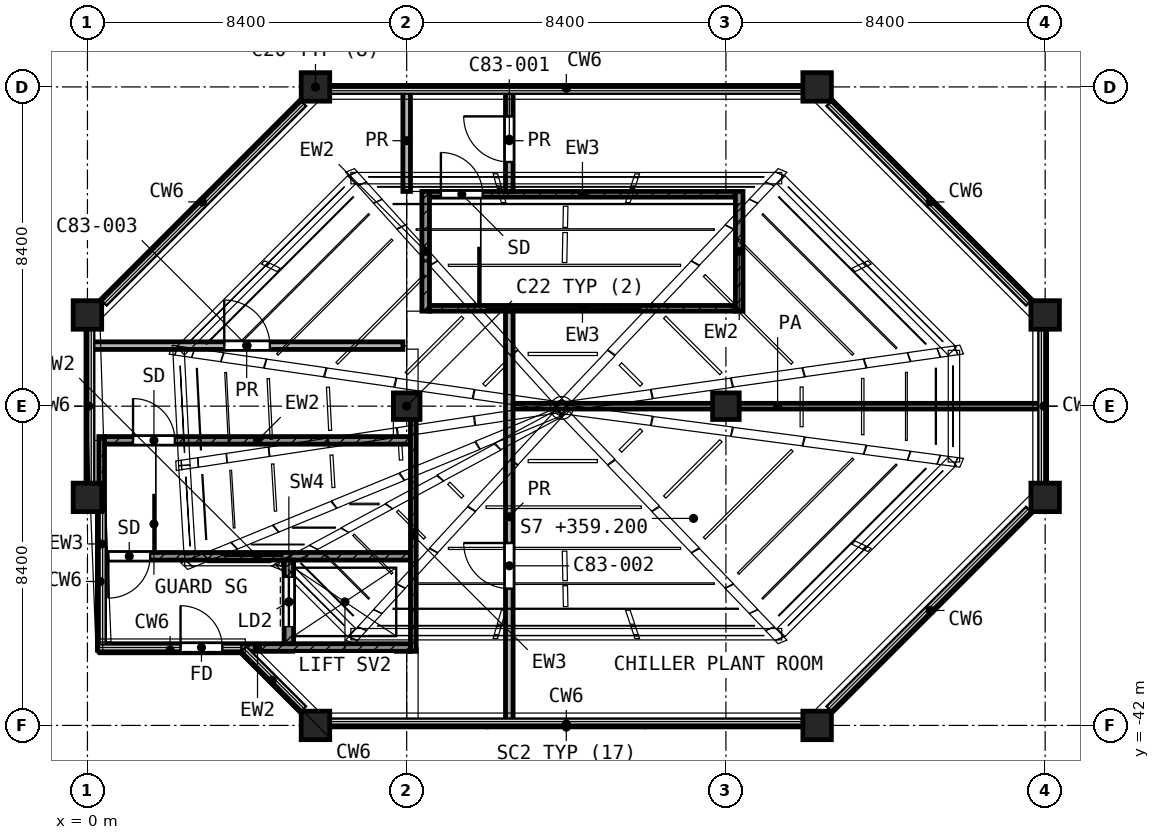
"""IFC4 building model, lengths in metres.
Left out: names, types, materials, properties, quantities, classifications, styles, units other than length and angle.
Written with IfcOpenShell. Run it as: python <this file> out.ifc"""

import sys

from ifc_helpers import new_model, si_unit, direction, frame, frame_2d, origin, origin_2d, place, context, subcontext, project, spatial, rectangle, extrude, element, fill, save


model = new_model("IFC4")
c1 = context("Model", 3, precision=1e-05, world=origin(), true_north=direction((0.0, 1.0)))
c2 = subcontext(c1, "Body", "Model", "MODEL_VIEW")
j1 = project(units=[si_unit("LENGTHUNIT", "METRE"), si_unit("PLANEANGLEUNIT", "RADIAN")], contexts=[c1])
p1 = place(None, origin())
s1 = spatial("IfcSite", under=j1, at=p1, CompositionType="ELEMENT")
p2 = place(p1, origin())
s2 = spatial("IfcBuilding", under=s1, at=p2, CompositionType="ELEMENT")
p3 = place(p2, frame((0.0, 0.0, 359.2)))
s3 = spatial("IfcBuildingStorey", under=s2, at=p3, CompositionType="ELEMENT", Elevation=359.2)
for number, where, z_axis, x_axis in (
    (1, (6.0, -25.2, 0.0), (0.0, 0.0, 1.0), (1.0, 0.0, 0.0)),
    (2, (19.2, -25.2, 0.0), (0.0, 0.0, 1.0), (1.0, 0.0, 0.0)),
    (3, (0.0, -31.2, 0.0), (0.0, 0.0, 1.0), (1.0, 0.0, 0.0)),
    (4, (25.2, -31.2, 0.0), (0.0, 0.0, 1.0), (1.0, 0.0, 0.0)),
):
    element("IfcColumn", number, at=place(p3, frame(where, z_axis=z_axis, x_axis=x_axis)), inside=s3, PredefinedType="COLUMN", context=c2, shape_type="SweptSolid", body=[
        extrude(rectangle(XDim=0.75, YDim=0.75, at=origin_2d()), origin(), (0.0, 0.0, 1.0), 4.5),
    ])
for number, where, z_axis, x_axis in (
    (5, (8.4, -33.6, 0.0), (0.0, 0.0, 1.0), (1.0, 0.0, 0.0)),
    (6, (16.8, -33.6, 0.0), (0.0, 0.0, 1.0), (1.0, 0.0, 0.0)),
):
    element("IfcColumn", number, at=place(p3, frame(where, z_axis=z_axis, x_axis=x_axis)), inside=s3, PredefinedType="COLUMN", context=c2, shape_type="SweptSolid", body=[
        extrude(rectangle(XDim=0.7, YDim=0.7, at=origin_2d()), origin(), (0.0, 0.0, 1.0), 4.5),
    ])
for number, where, z_axis, x_axis in (
    (7, (0.0, -36.0, 0.0), (0.0, 0.0, 1.0), (1.0, 0.0, 0.0)),
    (8, (25.2, -36.0, 0.0), (0.0, 0.0, 1.0), (1.0, 0.0, 0.0)),
    (9, (6.0, -42.0, 0.0), (0.0, 0.0, 1.0), (1.0, 0.0, 0.0)),
    (10, (19.2, -42.0, 0.0), (0.0, 0.0, 1.0), (1.0, 0.0, 0.0)),
):
    element("IfcColumn", number, at=place(p3, frame(where, z_axis=z_axis, x_axis=x_axis)), inside=s3, PredefinedType="COLUMN", context=c2, shape_type="SweptSolid", body=[
        extrude(rectangle(XDim=0.75, YDim=0.75, at=origin_2d()), origin(), (0.0, 0.0, 1.0), 4.5),
    ])
p4 = place(p3, frame((0.305, -39.925, 4.5), z_axis=(0.0, 0.0, 1.0), x_axis=(1.0, 0.0, 0.0)))
e11 = element("IfcWall", 11, at=p4, inside=s3, PredefinedType="SOLIDWALL", context=c2, shape_type="SweptSolid", body=[
    extrude(rectangle(XDim=3.849, YDim=0.25, at=frame_2d((1.924, 0.0))), origin(), (0.0, 0.0, 1.0), 1.1),
])
p5 = place(p3, frame((4.138, -39.962, 4.5), z_axis=(0.0, 0.0, 1.0), x_axis=(0.707106781187, -0.707106781187, 0.0)))
e12 = element("IfcWall", 12, at=p5, inside=s3, PredefinedType="SOLIDWALL", context=c2, shape_type="SweptSolid", body=[
    extrude(rectangle(XDim=2.654, YDim=0.25, at=frame_2d((1.327, 0.0))), origin(), (0.0, 0.0, 1.0), 1.1),
])
p6 = place(p3, frame((6.0, -41.875, 4.5), z_axis=(0.0, 0.0, 1.0), x_axis=(1.0, 0.0, 0.0)))
e13 = element("IfcWall", 13, at=p6, inside=s3, PredefinedType="SOLIDWALL", context=c2, shape_type="SweptSolid", body=[
    extrude(rectangle(XDim=13.2, YDim=0.25, at=frame_2d((6.6, 0.0))), origin(), (0.0, 0.0, 1.0), 1.1),
])
p7 = place(p3, frame((19.185, -41.838, 4.5), z_axis=(0.0, 0.0, 1.0), x_axis=(0.707106781187, 0.707106781187, 0.0)))
e14 = element("IfcWall", 14, at=p7, inside=s3, PredefinedType="SOLIDWALL", context=c2, shape_type="SweptSolid", body=[
    extrude(rectangle(XDim=8.278, YDim=0.25, at=frame_2d((4.139, 0.0))), origin(), (0.0, 0.0, 1.0), 1.1),
])
p8 = place(p3, frame((25.075, -36.0, 4.5), z_axis=(0.0, 0.0, 1.0), x_axis=(0.0, 1.0, 0.0)))
e15 = element("IfcWall", 15, at=p8, inside=s3, PredefinedType="SOLIDWALL", context=c2, shape_type="SweptSolid", body=[
    extrude(rectangle(XDim=4.8, YDim=0.25, at=frame_2d((2.4, 0.0))), origin(), (0.0, 0.0, 1.0), 1.1),
])
p9 = place(p3, frame((25.038, -31.215, 4.5), z_axis=(0.0, 0.0, 1.0), x_axis=(-0.707106781187, 0.707106781187, 0.0)))
e16 = element("IfcWall", 16, at=p9, inside=s3, PredefinedType="SOLIDWALL", context=c2, shape_type="SweptSolid", body=[
    extrude(rectangle(XDim=8.278, YDim=0.25, at=frame_2d((4.139, 0.0))), origin(), (0.0, 0.0, 1.0), 1.1),
])
p10 = place(p3, frame((19.2, -25.325, 4.5), z_axis=(0.0, 0.0, 1.0), x_axis=(-1.0, 0.0, 0.0)))
e17 = element("IfcWall", 17, at=p10, inside=s3, PredefinedType="SOLIDWALL", context=c2, shape_type="SweptSolid", body=[
    extrude(rectangle(XDim=13.2, YDim=0.25, at=frame_2d((6.6, 0.0))), origin(), (0.0, 0.0, 1.0), 1.1),
])
p11 = place(p3, frame((6.015, -25.362, 4.5), z_axis=(0.0, 0.0, 1.0), x_axis=(-0.707106781187, -0.707106781187, 0.0)))
e18 = element("IfcWall", 18, at=p11, inside=s3, PredefinedType="SOLIDWALL", context=c2, shape_type="SweptSolid", body=[
    extrude(rectangle(XDim=8.276, YDim=0.25, at=frame_2d((4.138, 0.0))), origin(), (0.0, 0.0, 1.0), 1.1),
])
p12 = place(p3, frame((0.123, -31.198, 4.5), z_axis=(0.0, 0.0, 1.0), x_axis=(0.030920746352, -0.999521839404, 0.0)))
e19 = element("IfcWall", 19, at=p12, inside=s3, PredefinedType="SOLIDWALL", context=c2, shape_type="SweptSolid", body=[
    extrude(rectangle(XDim=4.903, YDim=0.25, at=frame_2d((2.452, 0.0))), origin(), (0.0, 0.0, 1.0), 1.1),
])
p13 = place(p3, frame((0.275, -36.099, 4.5), z_axis=(0.0, 0.0, 1.0), x_axis=(0.039229380017, -0.9992302316, 0.0)))
e20 = element("IfcWall", 20, at=p13, inside=s3, PredefinedType="SOLIDWALL", context=c2, shape_type="SweptSolid", body=[
    extrude(rectangle(XDim=3.709, YDim=0.25, at=frame_2d((1.854, 0.0))), origin(), (0.0, 0.0, 1.0), 1.1),
])
p14 = place(p3, frame((1.703, -31.971, 4.5), z_axis=(0.0, 0.0, 1.0), x_axis=(0.707106781187, 0.707106781187, 0.0)))
e21 = element("IfcWall", 21, at=p14, inside=s3, PredefinedType="SOLIDWALL", context=c2, shape_type="SweptSolid", body=[
    extrude(rectangle(XDim=7.164, YDim=0.3, at=frame_2d((3.582, 0.0))), origin(), (0.0, 0.0, 1.0), 0.4),
])
p15 = place(p3, frame((6.787, -26.95, 4.5), z_axis=(0.0, 0.0, 1.0), x_axis=(1.0, 0.0, 0.0)))
e22 = element("IfcWall", 22, at=p15, inside=s3, PredefinedType="SOLIDWALL", context=c2, shape_type="SweptSolid", body=[
    extrude(rectangle(XDim=11.626, YDim=0.3, at=frame_2d((5.813, 0.0))), origin(), (0.0, 0.0, 1.0), 0.4),
])
p16 = place(p3, frame((18.431, -26.906, 4.5), z_axis=(0.0, 0.0, 1.0), x_axis=(0.707106781187, -0.707106781187, 0.0)))
e23 = element("IfcWall", 23, at=p16, inside=s3, PredefinedType="SOLIDWALL", context=c2, shape_type="SweptSolid", body=[
    extrude(rectangle(XDim=7.16, YDim=0.3, at=frame_2d((3.58, 0.0))), origin(), (0.0, 0.0, 1.0), 0.4),
])
p17 = place(p3, frame((23.45, -31.987, 4.5), z_axis=(0.0, 0.0, 1.0), x_axis=(0.0, -1.0, 0.0)))
e24 = element("IfcWall", 24, at=p17, inside=s3, PredefinedType="SOLIDWALL", context=c2, shape_type="SweptSolid", body=[
    extrude(rectangle(XDim=3.226, YDim=0.3, at=frame_2d((1.613, 0.0))), origin(), (0.0, 0.0, 1.0), 0.4),
])
p18 = place(p3, frame((23.494, -35.231, 4.5), z_axis=(0.0, 0.0, 1.0), x_axis=(-0.707106781187, -0.707106781187, 0.0)))
e25 = element("IfcWall", 25, at=p18, inside=s3, PredefinedType="SOLIDWALL", context=c2, shape_type="SweptSolid", body=[
    extrude(rectangle(XDim=7.16, YDim=0.3, at=frame_2d((3.58, 0.0))), origin(), (0.0, 0.0, 1.0), 0.4),
])
p19 = place(p3, frame((18.413, -40.25, 4.5), z_axis=(0.0, 0.0, 1.0), x_axis=(-1.0, 0.0, 0.0)))
e26 = element("IfcWall", 26, at=p19, inside=s3, PredefinedType="SOLIDWALL", context=c2, shape_type="SweptSolid", body=[
    extrude(rectangle(XDim=11.626, YDim=0.3, at=frame_2d((5.813, 0.0))), origin(), (0.0, 0.0, 1.0), 0.4),
])
p20 = place(p3, frame((6.769, -40.294, 4.5), z_axis=(0.0, 0.0, 1.0), x_axis=(-0.707106781187, 0.707106781187, 0.0)))
e27 = element("IfcWall", 27, at=p20, inside=s3, PredefinedType="SOLIDWALL", context=c2, shape_type="SweptSolid", body=[
    extrude(rectangle(XDim=2.882, YDim=0.3, at=frame_2d((1.441, 0.0))), origin(), (0.0, 0.0, 1.0), 0.4),
])
p21 = place(p3, frame((4.713, -38.3, 4.5), z_axis=(0.0, 0.0, 1.0), x_axis=(-1.0, 0.0, 0.0)))
e28 = element("IfcWall", 28, at=p21, inside=s3, PredefinedType="SOLIDWALL", context=c2, shape_type="SweptSolid", body=[
    extrude(rectangle(XDim=2.52, YDim=0.3, at=frame_2d((1.26, 0.0))), origin(), (0.0, 0.0, 1.0), 0.4),
])
p22 = place(p3, frame((2.057, -38.442, 4.5), z_axis=(0.0, 0.0, 1.0), x_axis=(-0.052109351445, 0.998641384828, 0.0)))
e29 = element("IfcWall", 29, at=p22, inside=s3, PredefinedType="SOLIDWALL", context=c2, shape_type="SweptSolid", body=[
    extrude(rectangle(XDim=3.022, YDim=0.3, at=frame_2d((1.511, 0.0))), origin(), (0.0, 0.0, 1.0), 0.4),
])
p23 = place(p3, frame((1.9, -35.424, 4.5), z_axis=(0.0, 0.0, 1.0), x_axis=(-0.042836071877, 0.999082114216, 0.0)))
e30 = element("IfcWall", 30, at=p23, inside=s3, PredefinedType="SOLIDWALL", context=c2, shape_type="SweptSolid", body=[
    extrude(rectangle(XDim=3.437, YDim=0.3, at=frame_2d((1.718, 0.0))), origin(), (0.0, 0.0, 1.0), 0.4),
])
p24 = place(p3, frame((0.375, -40.05, 0.0), z_axis=(0.0, 0.0, 1.0), x_axis=(0.0, 1.0, 0.0)))
e31 = element("IfcWall", 31, at=p24, inside=s3, PredefinedType="SHEAR", context=c2, shape_type="SweptSolid", body=[
    extrude(rectangle(XDim=5.65, YDim=0.15, at=frame_2d((2.825, 0.0))), origin(), (0.0, 0.0, 1.0), 4.15),
])
p25 = place(p3, frame((8.575, -40.05, 0.0), z_axis=(0.0, 0.0, 1.0), x_axis=(0.0, 1.0, 0.0)))
e32 = element("IfcWall", 32, at=p25, inside=s3, PredefinedType="SHEAR", context=c2, shape_type="SweptSolid", body=[
    extrude(rectangle(XDim=6.1, YDim=0.15, at=frame_2d((3.05, 0.0))), origin(), (0.0, 0.0, 1.0), 4.15),
])
p26 = place(p3, frame((0.45, -34.5, 0.0), z_axis=(0.0, 0.0, 1.0), x_axis=(1.0, 0.0, 0.0)))
e33 = element("IfcWall", 33, at=p26, inside=s3, PredefinedType="SHEAR", context=c2, shape_type="SweptSolid", body=[
    extrude(rectangle(XDim=8.05, YDim=0.2, at=frame_2d((4.025, 0.0))), origin(), (0.0, 0.0, 1.0), 4.15),
])
p27 = place(p26, frame((0.75, 0.0, 0.0)))
e34 = element("IfcOpeningElement", 34, at=p27, cuts=e33, PredefinedType="OPENING", context=c2, shape_type="SweptSolid", body=[
    extrude(rectangle(XDim=1.1, YDim=2.1, at=frame_2d((0.55, 1.05))), frame((0.0, 0.11, 0.0), z_axis=(0.0, -1.0, 0.0), x_axis=(1.0, 0.0, 0.0)), (0.0, 0.0, 1.0), 0.22),
])
p28 = place(p3, frame((0.45, -37.55, 0.0), z_axis=(0.0, 0.0, 1.0), x_axis=(1.0, 0.0, 0.0)))
e35 = element("IfcWall", 35, at=p28, inside=s3, PredefinedType="SHEAR", context=c2, shape_type="SweptSolid", body=[
    extrude(rectangle(XDim=8.05, YDim=0.2, at=frame_2d((4.025, 0.0))), origin(), (0.0, 0.0, 1.0), 4.15),
])
p29 = place(p28, frame((0.1, 0.0, 0.0)))
e36 = element("IfcOpeningElement", 36, at=p29, cuts=e35, PredefinedType="OPENING", context=c2, shape_type="SweptSolid", body=[
    extrude(rectangle(XDim=1.1, YDim=2.1, at=frame_2d((0.55, 1.05))), frame((0.0, 0.11, 0.0), z_axis=(0.0, -1.0, 0.0), x_axis=(1.0, 0.0, 0.0)), (0.0, 0.0, 1.0), 0.22),
])
p30 = place(p3, frame((0.45, -39.95, 0.0), z_axis=(0.0, 0.0, 1.0), x_axis=(1.0, 0.0, 0.0)))
e37 = element("IfcWall", 37, at=p30, inside=s3, PredefinedType="SHEAR", context=c2, shape_type="SweptSolid", body=[
    extrude(rectangle(XDim=8.05, YDim=0.2, at=frame_2d((4.025, 0.0))), origin(), (0.0, 0.0, 1.0), 4.15),
])
p31 = place(p30, frame((2.0, 0.0, 0.0)))
e38 = element("IfcOpeningElement", 38, at=p31, cuts=e37, PredefinedType="OPENING", context=c2, shape_type="SweptSolid", body=[
    extrude(rectangle(XDim=1.1, YDim=2.1, at=frame_2d((0.55, 1.05))), frame((0.0, 0.11, 0.0), z_axis=(0.0, -1.0, 0.0), x_axis=(1.0, 0.0, 0.0)), (0.0, 0.0, 1.0), 0.22),
])
p32 = place(p3, frame((5.3, -39.85, 0.0), z_axis=(0.0, 0.0, 1.0), x_axis=(0.0, 1.0, 0.0)))
e39 = element("IfcWall", 39, at=p32, inside=s3, PredefinedType="SHEAR", context=c2, shape_type="SweptSolid", body=[
    extrude(rectangle(XDim=2.2, YDim=0.25, at=frame_2d((1.1, 0.0))), origin(), (0.0, 0.0, 1.0), 4.15),
])
p33 = place(p32, frame((0.45, 0.0, 0.0)))
e40 = element("IfcOpeningElement", 40, at=p33, cuts=e39, PredefinedType="OPENING", context=c2, shape_type="SweptSolid", body=[
    extrude(rectangle(XDim=1.3, YDim=2.1, at=frame_2d((0.65, 1.05))), frame((0.0, 0.135, 0.0), z_axis=(0.0, -1.0, 0.0), x_axis=(1.0, 0.0, 0.0)), (0.0, 0.0, 1.0), 0.27),
])
for number, where, z_axis, x_axis in (
    (41, (8.9, -31.1, 0.0), (0.0, 0.0, 1.0), (0.0, 1.0, 0.0)),
    (42, (17.15, -31.1, 0.0), (0.0, 0.0, 1.0), (0.0, 1.0, 0.0)),
):
    element("IfcWall", number, at=place(p3, frame(where, z_axis=z_axis, x_axis=x_axis)), inside=s3, PredefinedType="SHEAR", context=c2, shape_type="SweptSolid", body=[
        extrude(rectangle(XDim=3.15, YDim=0.2, at=frame_2d((1.575, 0.0))), origin(), (0.0, 0.0, 1.0), 4.15),
    ])
p34 = place(p3, frame((9.0, -28.025, 0.0), z_axis=(0.0, 0.0, 1.0), x_axis=(1.0, 0.0, 0.0)))
e43 = element("IfcWall", 43, at=p34, inside=s3, PredefinedType="SHEAR", context=c2, shape_type="SweptSolid", body=[
    extrude(rectangle(XDim=8.05, YDim=0.15, at=frame_2d((4.025, 0.0))), origin(), (0.0, 0.0, 1.0), 4.15),
])
p35 = place(p34, frame((0.3, 0.0, 0.0)))
e44 = element("IfcOpeningElement", 44, at=p35, cuts=e43, PredefinedType="OPENING", context=c2, shape_type="SweptSolid", body=[
    extrude(rectangle(XDim=1.1, YDim=2.1, at=frame_2d((0.55, 1.05))), frame((0.0, 0.085, 0.0), z_axis=(0.0, -1.0, 0.0), x_axis=(1.0, 0.0, 0.0)), (0.0, 0.0, 1.0), 0.17),
])
p36 = place(p3, frame((9.0, -31.025, 0.0), z_axis=(0.0, 0.0, 1.0), x_axis=(1.0, 0.0, 0.0)))
e45 = element("IfcWall", 45, at=p36, inside=s3, PredefinedType="SHEAR", context=c2, shape_type="SweptSolid", body=[
    extrude(rectangle(XDim=8.05, YDim=0.15, at=frame_2d((4.025, 0.0))), origin(), (0.0, 0.0, 1.0), 4.15),
])
p37 = place(p3, frame((11.2, -33.6, 0.0), z_axis=(0.0, 0.0, 1.0), x_axis=(1.0, 0.0, 0.0)))
e46 = element("IfcWall", 46, at=p37, inside=s3, PredefinedType="PARTITIONING", context=c2, shape_type="SweptSolid", body=[
    extrude(rectangle(XDim=13.92, YDim=0.15, at=frame_2d((6.96, 0.0))), origin(), (0.0, 0.0, 1.0), 4.5),
])
p38 = place(p3, frame((0.08, -32.007, 0.0), z_axis=(0.0, 0.0, 1.0), x_axis=(1.0, 0.0, 0.0)))
e47 = element("IfcWall", 47, at=p38, inside=s3, PredefinedType="PARTITIONING", context=c2, shape_type="SweptSolid", body=[
    extrude(rectangle(XDim=8.22, YDim=0.2, at=frame_2d((4.11, 0.0))), origin(), (0.0, 0.0, 1.0), 4.5),
])
p39 = place(p38, frame((3.52, 0.0, 0.0)))
e48 = element("IfcOpeningElement", 48, at=p39, cuts=e47, PredefinedType="OPENING", context=c2, shape_type="SweptSolid", body=[
    extrude(rectangle(XDim=1.2, YDim=2.1, at=frame_2d((0.6, 1.05))), frame((0.0, 0.11, 0.0), z_axis=(0.0, -1.0, 0.0), x_axis=(1.0, 0.0, 0.0)), (0.0, 0.0, 1.0), 0.22),
])
p40 = place(p3, frame((8.4, -27.95, 0.0), z_axis=(0.0, 0.0, 1.0), x_axis=(0.0, 1.0, 0.0)))
e49 = element("IfcWall", 49, at=p40, inside=s3, PredefinedType="PARTITIONING", context=c2, shape_type="SweptSolid", body=[
    extrude(rectangle(XDim=2.67, YDim=0.2, at=frame_2d((1.335, 0.0))), origin(), (0.0, 0.0, 1.0), 4.5),
])
p41 = place(p3, frame((11.1, -41.92, 0.0), z_axis=(0.0, 0.0, 1.0), x_axis=(0.0, 1.0, 0.0)))
e50 = element("IfcWall", 50, at=p41, inside=s3, PredefinedType="PARTITIONING", context=c2, shape_type="SweptSolid", body=[
    extrude(rectangle(XDim=10.82, YDim=0.2, at=frame_2d((5.41, 0.0))), origin(), (0.0, 0.0, 1.0), 4.5),
])
p42 = place(p41, frame((3.52, 0.0, 0.0)))
e51 = element("IfcOpeningElement", 51, at=p42, cuts=e50, PredefinedType="OPENING", context=c2, shape_type="SweptSolid", body=[
    extrude(rectangle(XDim=1.2, YDim=2.1, at=frame_2d((0.6, 1.05))), frame((0.0, 0.11, 0.0), z_axis=(0.0, -1.0, 0.0), x_axis=(1.0, 0.0, 0.0)), (0.0, 0.0, 1.0), 0.22),
])
p43 = place(p3, frame((11.1, -27.95, 0.0), z_axis=(0.0, 0.0, 1.0), x_axis=(0.0, 1.0, 0.0)))
e52 = element("IfcWall", 52, at=p43, inside=s3, PredefinedType="PARTITIONING", context=c2, shape_type="SweptSolid", body=[
    extrude(rectangle(XDim=2.67, YDim=0.2, at=frame_2d((1.335, 0.0))), origin(), (0.0, 0.0, 1.0), 4.5),
])
p44 = place(p43, frame((0.775, 0.0, 0.0)))
e53 = element("IfcOpeningElement", 53, at=p44, cuts=e52, PredefinedType="OPENING", context=c2, shape_type="SweptSolid", body=[
    extrude(rectangle(XDim=1.2, YDim=2.1, at=frame_2d((0.6, 1.05))), frame((0.0, 0.11, 0.0), z_axis=(0.0, -1.0, 0.0), x_axis=(1.0, 0.0, 0.0)), (0.0, 0.0, 1.0), 0.22),
])
p45 = place(p27, origin())
e54 = element("IfcDoor", 54, at=p45, inside=s3, OperationType="SINGLE_SWING_LEFT", PredefinedType="DOOR", context=c2, shape_type="SweptSolid", body=[
    extrude(rectangle(XDim=1.1, YDim=2.1, at=frame_2d((0.55, 1.05))), frame((0.0, 0.025, 0.0), z_axis=(0.0, -1.0, 0.0), x_axis=(1.0, 0.0, 0.0)), (0.0, 0.0, 1.0), 0.05),
])
fill(e34, e54)
p46 = place(p29, frame((1.1, 0.0, 0.0), z_axis=(0.0, 0.0, 1.0), x_axis=(-1.0, 0.0, 0.0)))
e55 = element("IfcDoor", 55, at=p46, inside=s3, OperationType="SINGLE_SWING_LEFT", PredefinedType="DOOR", context=c2, shape_type="SweptSolid", body=[
    extrude(rectangle(XDim=1.1, YDim=2.1, at=frame_2d((0.55, 1.05))), frame((0.0, 0.025, 0.0), z_axis=(0.0, -1.0, 0.0), x_axis=(1.0, 0.0, 0.0)), (0.0, 0.0, 1.0), 0.05),
])
fill(e36, e55)
p47 = place(p33, origin())
e56 = element("IfcDoor", 56, at=p47, inside=s3, OperationType="DOUBLE_DOOR_SLIDING", PredefinedType="DOOR", context=c2, shape_type="SweptSolid", body=[
    extrude(rectangle(XDim=1.3, YDim=2.1, at=frame_2d((0.65, 1.05))), frame((0.0, 0.025, 0.0), z_axis=(0.0, -1.0, 0.0), x_axis=(1.0, 0.0, 0.0)), (0.0, 0.0, 1.0), 0.05),
])
fill(e40, e56)
p48 = place(p31, origin())
e57 = element("IfcDoor", 57, at=p48, inside=s3, OperationType="SINGLE_SWING_LEFT", PredefinedType="DOOR", context=c2, shape_type="SweptSolid", body=[
    extrude(rectangle(XDim=1.1, YDim=2.1, at=frame_2d((0.55, 1.05))), frame((0.0, 0.025, 0.0), z_axis=(0.0, -1.0, 0.0), x_axis=(1.0, 0.0, 0.0)), (0.0, 0.0, 1.0), 0.05),
])
fill(e38, e57)
p49 = place(p35, origin())
e58 = element("IfcDoor", 58, at=p49, inside=s3, OperationType="SINGLE_SWING_LEFT", PredefinedType="DOOR", context=c2, shape_type="SweptSolid", body=[
    extrude(rectangle(XDim=1.1, YDim=2.1, at=frame_2d((0.55, 1.05))), frame((0.0, 0.025, 0.0), z_axis=(0.0, -1.0, 0.0), x_axis=(1.0, 0.0, 0.0)), (0.0, 0.0, 1.0), 0.05),
])
fill(e44, e58)
p50 = place(p44, origin())
e59 = element("IfcDoor", 59, at=p50, inside=s3, OperationType="SINGLE_SWING_RIGHT", PredefinedType="DOOR", context=c2, shape_type="SweptSolid", body=[
    extrude(rectangle(XDim=1.2, YDim=2.1, at=frame_2d((0.6, 1.05))), frame((0.0, 0.025, 0.0), z_axis=(0.0, -1.0, 0.0), x_axis=(1.0, 0.0, 0.0)), (0.0, 0.0, 1.0), 0.05),
])
fill(e53, e59)
p51 = place(p42, origin())
e60 = element("IfcDoor", 60, at=p51, inside=s3, OperationType="SINGLE_SWING_RIGHT", PredefinedType="DOOR", context=c2, shape_type="SweptSolid", body=[
    extrude(rectangle(XDim=1.2, YDim=2.1, at=frame_2d((0.6, 1.05))), frame((0.0, 0.025, 0.0), z_axis=(0.0, -1.0, 0.0), x_axis=(1.0, 0.0, 0.0)), (0.0, 0.0, 1.0), 0.05),
])
fill(e51, e60)
p52 = place(p39, origin())
e61 = element("IfcDoor", 61, at=p52, inside=s3, OperationType="SINGLE_SWING_LEFT", PredefinedType="DOOR", context=c2, shape_type="SweptSolid", body=[
    extrude(rectangle(XDim=1.2, YDim=2.1, at=frame_2d((0.6, 1.05))), frame((0.0, 0.025, 0.0), z_axis=(0.0, -1.0, 0.0), x_axis=(1.0, 0.0, 0.0)), (0.0, 0.0, 1.0), 0.05),
])
fill(e48, e61)
save(model, sys.argv[1])
